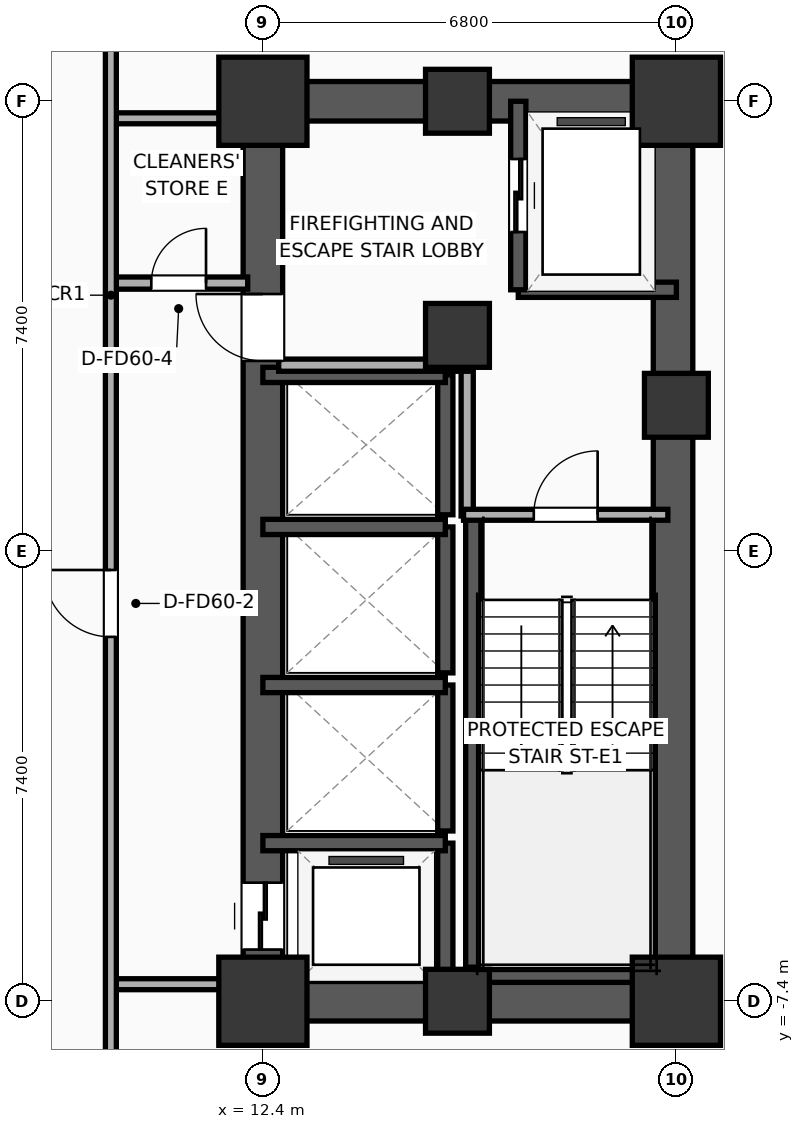
"""IFC4 building model, lengths in metres.
Left out: names, types, materials, properties, quantities, classifications, styles, units other than length and angle.
Written with IfcOpenShell. Run it as: python <this file> out.ifc"""

import sys

from ifc_helpers import new_model, si_unit, direction, frame, frame_2d, origin, origin_2d, place, context, subcontext, project, spatial, rectangle, extrude, element, fill, save


model = new_model("IFC4")
c1 = context("Model", 3, precision=1e-05, world=origin(), true_north=direction((0.0, 1.0)))
c2 = subcontext(c1, "Body", "Model", "MODEL_VIEW")
j1 = project(units=[si_unit("LENGTHUNIT", "METRE"), si_unit("PLANEANGLEUNIT", "RADIAN")], contexts=[c1])
p1 = place(None, origin())
s1 = spatial("IfcSite", under=j1, at=p1, CompositionType="ELEMENT")
p2 = place(p1, origin())
s2 = spatial("IfcBuilding", under=s1, at=p2, CompositionType="ELEMENT")
p3 = place(p2, frame((0.0, 0.0, 37.7)))
s3 = spatial("IfcBuildingStorey", under=s2, at=p3, CompositionType="ELEMENT", Elevation=37.7)
p4 = place(p3, frame((12.4, -7.4, 0.0), z_axis=(0.0, 0.0, 1.0), x_axis=(1.0, 0.0, 0.0)))
e1 = element("IfcColumn", 1, at=p4, inside=s3, PredefinedType="COLUMN", context=c2, shape_type="SweptSolid", body=[
    extrude(rectangle(XDim=1.45, YDim=1.45, at=origin_2d()), origin(), (0.0, 0.0, 1.0), 3.9),
])
p5 = place(p3, frame((15.6, 3.55, 0.0), z_axis=(0.0, 0.0, 1.0), x_axis=(1.0, 0.0, 0.0)))
e2 = element("IfcColumn", 2, at=p5, inside=s3, PredefinedType="COLUMN", context=c2, shape_type="SweptSolid", body=[
    extrude(rectangle(XDim=1.05, YDim=1.05, at=origin_2d()), origin(), (0.0, 0.0, 1.0), 3.9),
])
p6 = place(p3, frame((12.4, 7.4, 0.0), z_axis=(0.0, 0.0, 1.0), x_axis=(1.0, 0.0, 0.0)))
e3 = element("IfcColumn", 3, at=p6, inside=s3, PredefinedType="COLUMN", context=c2, shape_type="SweptSolid", body=[
    extrude(rectangle(XDim=1.45, YDim=1.45, at=origin_2d()), origin(), (0.0, 0.0, 1.0), 3.9),
])
for number, where, z_axis, x_axis in (
    (4, (15.6, -7.4, 0.0), (0.0, 0.0, 1.0), (1.0, 0.0, 0.0)),
    (5, (15.6, 7.4, 0.0), (0.0, 0.0, 1.0), (1.0, 0.0, 0.0)),
):
    element("IfcColumn", number, at=place(p3, frame(where, z_axis=z_axis, x_axis=x_axis)), inside=s3, PredefinedType="COLUMN", context=c2, shape_type="SweptSolid", body=[
        extrude(rectangle(XDim=1.05, YDim=1.05, at=origin_2d()), origin(), (0.0, 0.0, 1.0), 3.9),
    ])
p7 = place(p3, frame((19.2, -7.4, 0.0), z_axis=(0.0, 0.0, 1.0), x_axis=(1.0, 0.0, 0.0)))
e6 = element("IfcColumn", 6, at=p7, inside=s3, PredefinedType="COLUMN", context=c2, shape_type="SweptSolid", body=[
    extrude(rectangle(XDim=1.45, YDim=1.45, at=origin_2d()), origin(), (0.0, 0.0, 1.0), 3.9),
])
p8 = place(p3, frame((19.2, 2.4, 0.0), z_axis=(0.0, 0.0, 1.0), x_axis=(1.0, 0.0, 0.0)))
e7 = element("IfcColumn", 7, at=p8, inside=s3, PredefinedType="COLUMN", context=c2, shape_type="SweptSolid", body=[
    extrude(rectangle(XDim=1.05, YDim=1.05, at=origin_2d()), origin(), (0.0, 0.0, 1.0), 3.9),
])
p9 = place(p3, frame((19.2, 7.4, 0.0), z_axis=(0.0, 0.0, 1.0), x_axis=(1.0, 0.0, 0.0)))
e8 = element("IfcColumn", 8, at=p9, inside=s3, PredefinedType="COLUMN", context=c2, shape_type="SweptSolid", body=[
    extrude(rectangle(XDim=1.45, YDim=1.45, at=origin_2d()), origin(), (0.0, 0.0, 1.0), 3.9),
])
for number, where, z_axis, x_axis in (
    (9, (12.075, -7.4, 0.0), (0.0, 0.0, 1.0), (1.0, 0.0, 0.0)),
    (10, (12.075, 7.4, 0.0), (0.0, 0.0, 1.0), (1.0, 0.0, 0.0)),
):
    element("IfcWall", number, at=place(p3, frame(where, z_axis=z_axis, x_axis=x_axis)), inside=s3, PredefinedType="SHEAR", context=c2, shape_type="SweptSolid", body=[
        extrude(rectangle(XDim=7.45, YDim=0.65, at=frame_2d((3.725, 0.0))), origin(), (0.0, 0.0, 1.0), 3.65),
    ])
p10 = place(p3, frame((12.4, -7.4, 0.0), z_axis=(0.0, 0.0, 1.0), x_axis=(0.0, 1.0, 0.0)))
e11 = element("IfcWall", 11, at=p10, inside=s3, PredefinedType="SHEAR", context=c2, shape_type="SweptSolid", body=[
    extrude(rectangle(XDim=14.8, YDim=0.65, at=frame_2d((7.4, 0.0))), origin(), (0.0, 0.0, 1.0), 3.65),
])
p11 = place(p10, frame((0.85, 0.0, 0.0)))
e12 = element("IfcOpeningElement", 12, at=p11, cuts=e11, PredefinedType="OPENING", context=c2, shape_type="SweptSolid", body=[
    extrude(rectangle(XDim=1.1, YDim=2.05, at=frame_2d((0.55, 1.025))), frame((0.0, 0.335, 0.0), z_axis=(0.0, -1.0, 0.0), x_axis=(1.0, 0.0, 0.0)), (0.0, 0.0, 1.0), 0.67),
])
p12 = place(p10, frame((10.53, 0.0, 0.0)))
e13 = element("IfcOpeningElement", 13, at=p12, cuts=e11, PredefinedType="OPENING", context=c2, shape_type="SweptSolid", body=[
    extrude(rectangle(XDim=1.1, YDim=2.05, at=frame_2d((0.55, 1.025))), frame((0.0, 0.335, 0.0), z_axis=(0.0, -1.0, 0.0), x_axis=(1.0, 0.0, 0.0)), (0.0, 0.0, 1.0), 0.67),
])
p13 = place(p3, frame((19.145, -7.4, 0.0), z_axis=(0.0, 0.0, 1.0), x_axis=(0.0, 1.0, 0.0)))
e14 = element("IfcWall", 14, at=p13, inside=s3, PredefinedType="SHEAR", context=c2, shape_type="SweptSolid", body=[
    extrude(rectangle(XDim=14.8, YDim=0.65, at=frame_2d((7.4, 0.0))), origin(), (0.0, 0.0, 1.0), 3.65),
])
p14 = place(p3, frame((15.86, -7.085, 0.0), z_axis=(0.0, 0.0, 1.0), x_axis=(0.0, 1.0, 0.0)))
e15 = element("IfcWall", 15, at=p14, inside=s3, PredefinedType="SOLIDWALL", context=c2, shape_type="SweptSolid", body=[
    extrude(rectangle(XDim=7.685, YDim=0.25, at=frame_2d((3.843, 0.0))), origin(), (0.0, 0.0, 1.0), 3.65),
])
p15 = place(p3, frame((15.74, -6.965, 0.0), z_axis=(0.0, 0.0, 1.0), x_axis=(1.0, 0.0, 0.0)))
e16 = element("IfcWall", 16, at=p15, inside=s3, PredefinedType="SOLIDWALL", context=c2, shape_type="SweptSolid", body=[
    extrude(rectangle(XDim=3.46, YDim=0.25, at=frame_2d((1.73, 0.0))), origin(), (0.0, 0.0, 1.0), 3.65),
])
p16 = place(p3, frame((16.6, 4.3, 0.0), z_axis=(0.0, 0.0, 1.0), x_axis=(1.0, 0.0, 0.0)))
e17 = element("IfcWall", 17, at=p16, inside=s3, PredefinedType="SOLIDWALL", context=c2, shape_type="SweptSolid", body=[
    extrude(rectangle(XDim=2.6, YDim=0.25, at=frame_2d((1.3, 0.0))), origin(), (0.0, 0.0, 1.0), 3.65),
])
p17 = place(p3, frame((16.6, 7.4, 0.0), z_axis=(0.0, 0.0, 1.0), x_axis=(0.0, -1.0, 0.0)))
e18 = element("IfcWall", 18, at=p17, inside=s3, PredefinedType="SOLIDWALL", context=c2, shape_type="SweptSolid", body=[
    extrude(rectangle(XDim=3.1, YDim=0.25, at=frame_2d((1.55, 0.0))), origin(), (0.0, 0.0, 1.0), 3.65),
])
p18 = place(p17, frame((0.95, 0.0, 0.0)))
e19 = element("IfcOpeningElement", 19, at=p18, cuts=e18, PredefinedType="OPENING", context=c2, shape_type="SweptSolid", body=[
    extrude(rectangle(XDim=1.2, YDim=2.05, at=frame_2d((0.6, 1.025))), frame((0.0, 0.135, 0.0), z_axis=(0.0, -1.0, 0.0), x_axis=(1.0, 0.0, 0.0)), (0.0, 0.0, 1.0), 0.27),
])
p19 = place(p3, frame((15.4, -7.4, 0.0), z_axis=(0.0, 0.0, 1.0), x_axis=(0.0, 1.0, 0.0)))
e20 = element("IfcWall", 20, at=p19, inside=s3, PredefinedType="SOLIDWALL", context=c2, shape_type="SweptSolid", body=[
    extrude(rectangle(XDim=2.6, YDim=0.25, at=frame_2d((1.3, 0.0))), origin(), (0.0, 0.0, 1.0), 3.65),
])
p20 = place(p3, frame((15.4, -4.8, 0.0), z_axis=(0.0, 0.0, 1.0), x_axis=(-1.0, 0.0, 0.0)))
e21 = element("IfcWall", 21, at=p20, inside=s3, PredefinedType="SOLIDWALL", context=c2, shape_type="SweptSolid", body=[
    extrude(rectangle(XDim=3.0, YDim=0.25, at=frame_2d((1.5, 0.0))), origin(), (0.0, 0.0, 1.0), 3.65),
])
p21 = place(p3, frame((15.4, -4.6, 0.0), z_axis=(0.0, 0.0, 1.0), x_axis=(0.0, 1.0, 0.0)))
e22 = element("IfcWall", 22, at=p21, inside=s3, PredefinedType="SOLIDWALL", context=c2, shape_type="SweptSolid", body=[
    extrude(rectangle(XDim=2.4, YDim=0.25, at=frame_2d((1.2, 0.0))), origin(), (0.0, 0.0, 1.0), 3.65),
])
p22 = place(p3, frame((15.4, -2.2, 0.0), z_axis=(0.0, 0.0, 1.0), x_axis=(-1.0, 0.0, 0.0)))
e23 = element("IfcWall", 23, at=p22, inside=s3, PredefinedType="SOLIDWALL", context=c2, shape_type="SweptSolid", body=[
    extrude(rectangle(XDim=3.0, YDim=0.25, at=frame_2d((1.5, 0.0))), origin(), (0.0, 0.0, 1.0), 3.65),
])
p23 = place(p3, frame((15.4, -2.0, 0.0), z_axis=(0.0, 0.0, 1.0), x_axis=(0.0, 1.0, 0.0)))
e24 = element("IfcWall", 24, at=p23, inside=s3, PredefinedType="SOLIDWALL", context=c2, shape_type="SweptSolid", body=[
    extrude(rectangle(XDim=2.4, YDim=0.25, at=frame_2d((1.2, 0.0))), origin(), (0.0, 0.0, 1.0), 3.65),
])
p24 = place(p3, frame((15.4, 0.4, 0.0), z_axis=(0.0, 0.0, 1.0), x_axis=(-1.0, 0.0, 0.0)))
e25 = element("IfcWall", 25, at=p24, inside=s3, PredefinedType="SOLIDWALL", context=c2, shape_type="SweptSolid", body=[
    extrude(rectangle(XDim=3.0, YDim=0.25, at=frame_2d((1.5, 0.0))), origin(), (0.0, 0.0, 1.0), 3.65),
])
p25 = place(p3, frame((15.4, 0.6, 0.0), z_axis=(0.0, 0.0, 1.0), x_axis=(0.0, 1.0, 0.0)))
e26 = element("IfcWall", 26, at=p25, inside=s3, PredefinedType="SOLIDWALL", context=c2, shape_type="SweptSolid", body=[
    extrude(rectangle(XDim=2.3, YDim=0.25, at=frame_2d((1.15, 0.0))), origin(), (0.0, 0.0, 1.0), 3.65),
])
p26 = place(p3, frame((15.4, 2.9, 0.0), z_axis=(0.0, 0.0, 1.0), x_axis=(-1.0, 0.0, 0.0)))
e27 = element("IfcWall", 27, at=p26, inside=s3, PredefinedType="SOLIDWALL", context=c2, shape_type="SweptSolid", body=[
    extrude(rectangle(XDim=3.0, YDim=0.25, at=frame_2d((1.5, 0.0))), origin(), (0.0, 0.0, 1.0), 3.65),
])
p27 = place(p3, frame((15.76, 0.58, 0.0), z_axis=(0.0, 0.0, 1.0), x_axis=(0.0, 1.0, 0.0)))
e28 = element("IfcWall", 28, at=p27, inside=s3, PredefinedType="PARTITIONING", context=c2, shape_type="SweptSolid", body=[
    extrude(rectangle(XDim=2.52, YDim=0.2, at=frame_2d((1.26, 0.0))), origin(), (0.0, 0.0, 1.0), 3.65),
])
p28 = place(p3, frame((12.66, 3.06, 0.0), z_axis=(0.0, 0.0, 1.0), x_axis=(1.0, 0.0, 0.0)))
e29 = element("IfcWall", 29, at=p28, inside=s3, PredefinedType="PARTITIONING", context=c2, shape_type="SweptSolid", body=[
    extrude(rectangle(XDim=3.16, YDim=0.2, at=frame_2d((1.58, 0.0))), origin(), (0.0, 0.0, 1.0), 3.65),
])
p29 = place(p3, frame((15.7, 0.6, 0.0), z_axis=(0.0, 0.0, 1.0), x_axis=(1.0, 0.0, 0.0)))
e30 = element("IfcWall", 30, at=p29, inside=s3, PredefinedType="PARTITIONING", context=c2, shape_type="SweptSolid", body=[
    extrude(rectangle(XDim=3.36, YDim=0.18, at=frame_2d((1.68, 0.0))), origin(), (0.0, 0.0, 1.0), 3.65),
])
p30 = place(p29, frame((1.155, 0.0, 0.0)))
e31 = element("IfcOpeningElement", 31, at=p30, cuts=e30, PredefinedType="OPENING", context=c2, shape_type="SweptSolid", body=[
    extrude(rectangle(XDim=1.05, YDim=2.05, at=frame_2d((0.525, 1.025))), frame((0.0, 0.1, 0.0), z_axis=(0.0, -1.0, 0.0), x_axis=(1.0, 0.0, 0.0)), (0.0, 0.0, 1.0), 0.2),
])
p31 = place(p3, frame((9.88, 4.41, 0.0), z_axis=(0.0, 0.0, 1.0), x_axis=(1.0, 0.0, 0.0)))
e32 = element("IfcWall", 32, at=p31, inside=s3, PredefinedType="PARTITIONING", context=c2, shape_type="SweptSolid", body=[
    extrude(rectangle(XDim=2.27, YDim=0.2, at=frame_2d((1.135, 0.0))), origin(), (0.0, 0.0, 1.0), 3.65),
])
p32 = place(p31, frame((0.685, 0.0, 0.0)))
e33 = element("IfcOpeningElement", 33, at=p32, cuts=e32, PredefinedType="OPENING", context=c2, shape_type="SweptSolid", body=[
    extrude(rectangle(XDim=0.9, YDim=2.05, at=frame_2d((0.45, 1.025))), frame((0.0, 0.11, 0.0), z_axis=(0.0, -1.0, 0.0), x_axis=(1.0, 0.0, 0.0)), (0.0, 0.0, 1.0), 0.22),
])
for number, where, z_axis, x_axis in (
    (34, (9.88, 7.12, 0.0), (0.0, 0.0, 1.0), (1.0, 0.0, 0.0)),
    (35, (9.88, -7.12, 0.0), (0.0, 0.0, 1.0), (1.0, 0.0, 0.0)),
):
    element("IfcWall", number, at=place(p3, frame(where, z_axis=z_axis, x_axis=x_axis)), inside=s3, PredefinedType="PARTITIONING", context=c2, shape_type="SweptSolid", body=[
        extrude(rectangle(XDim=2.27, YDim=0.18, at=frame_2d((1.135, 0.0))), origin(), (0.0, 0.0, 1.0), 2.94),
    ])
p33 = place(p3, frame((9.9, -8.58, 0.0), z_axis=(0.0, 0.0, 1.0), x_axis=(0.0, 1.0, 0.0)))
e36 = element("IfcWall", 36, at=p33, inside=s3, PredefinedType="PARTITIONING", context=c2, shape_type="SweptSolid", body=[
    extrude(rectangle(XDim=17.16, YDim=0.18, at=frame_2d((8.58, 0.0))), origin(), (0.0, 0.0, 1.0), 3.65),
])
p34 = place(p33, frame((7.172, 0.0, 0.0)))
e37 = element("IfcOpeningElement", 37, at=p34, cuts=e36, PredefinedType="OPENING", context=c2, shape_type="SweptSolid", body=[
    extrude(rectangle(XDim=1.1, YDim=2.05, at=frame_2d((0.55, 1.025))), frame((0.0, 0.1, 0.0), z_axis=(0.0, -1.0, 0.0), x_axis=(1.0, 0.0, 0.0)), (0.0, 0.0, 1.0), 0.2),
])
p35 = place(p18, origin())
e38 = element("IfcDoor", 38, at=p35, inside=s3, OperationType="SLIDING_TO_LEFT", PredefinedType="DOOR", context=c2, shape_type="SweptSolid", body=[
    extrude(rectangle(XDim=1.2, YDim=2.05, at=frame_2d((0.6, 1.025))), frame((0.0, 0.025, 0.0), z_axis=(0.0, -1.0, 0.0), x_axis=(1.0, 0.0, 0.0)), (0.0, 0.0, 1.0), 0.05),
])
fill(e19, e38)
p36 = place(p11, origin())
e39 = element("IfcDoor", 39, at=p36, inside=s3, OperationType="SLIDING_TO_LEFT", PredefinedType="DOOR", context=c2, shape_type="SweptSolid", body=[
    extrude(rectangle(XDim=1.1, YDim=2.05, at=frame_2d((0.55, 1.025))), frame((0.0, 0.025, 0.0), z_axis=(0.0, -1.0, 0.0), x_axis=(1.0, 0.0, 0.0)), (0.0, 0.0, 1.0), 0.05),
])
fill(e12, e39)
p37 = place(p30, origin())
e40 = element("IfcDoor", 40, at=p37, inside=s3, OperationType="SINGLE_SWING_RIGHT", PredefinedType="DOOR", context=c2, shape_type="SweptSolid", body=[
    extrude(rectangle(XDim=1.05, YDim=2.05, at=frame_2d((0.525, 1.025))), frame((0.0, 0.025, 0.0), z_axis=(0.0, -1.0, 0.0), x_axis=(1.0, 0.0, 0.0)), (0.0, 0.0, 1.0), 0.05),
])
fill(e31, e40)
p38 = place(p32, origin())
e41 = element("IfcDoor", 41, at=p38, inside=s3, OperationType="SINGLE_SWING_RIGHT", PredefinedType="DOOR", context=c2, shape_type="SweptSolid", body=[
    extrude(rectangle(XDim=0.9, YDim=2.05, at=frame_2d((0.45, 1.025))), frame((0.0, 0.025, 0.0), z_axis=(0.0, -1.0, 0.0), x_axis=(1.0, 0.0, 0.0)), (0.0, 0.0, 1.0), 0.05),
])
fill(e33, e41)
p39 = place(p34, origin())
e42 = element("IfcDoor", 42, at=p39, inside=s3, OperationType="SINGLE_SWING_RIGHT", PredefinedType="DOOR", context=c2, shape_type="SweptSolid", body=[
    extrude(rectangle(XDim=1.1, YDim=2.05, at=frame_2d((0.55, 1.025))), frame((0.0, 0.025, 0.0), z_axis=(0.0, -1.0, 0.0), x_axis=(1.0, 0.0, 0.0)), (0.0, 0.0, 1.0), 0.05),
])
fill(e37, e42)
p40 = place(p12, origin())
e43 = element("IfcDoor", 43, at=p40, inside=s3, OperationType="SINGLE_SWING_RIGHT", PredefinedType="DOOR", context=c2, shape_type="SweptSolid", body=[
    extrude(rectangle(XDim=1.1, YDim=2.05, at=frame_2d((0.55, 1.025))), frame((0.0, 0.025, 0.0), z_axis=(0.0, -1.0, 0.0), x_axis=(1.0, 0.0, 0.0)), (0.0, 0.0, 1.0), 0.05),
])
fill(e13, e43)
save(model, sys.argv[1])
